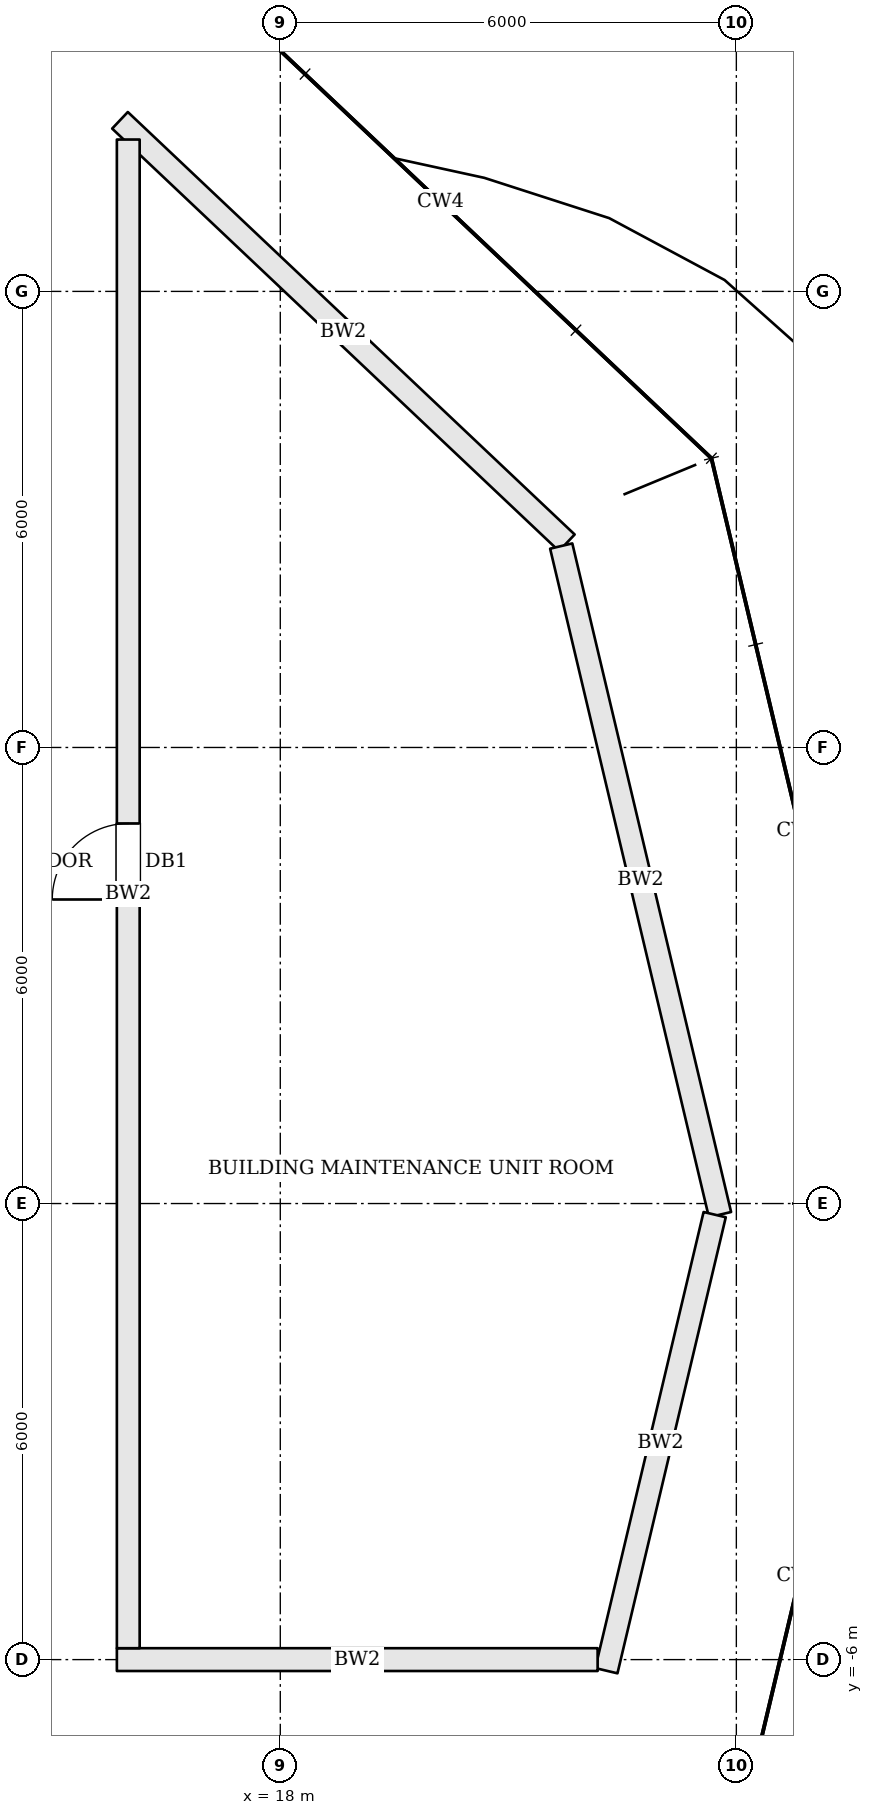
"""IFC4 building model, lengths in metres.
Left out: names, types, materials, properties, quantities, classifications, styles, units other than length and angle.
Written with IfcOpenShell. Run it as: python <this file> out.ifc"""

import sys

from ifc_helpers import new_model, si_unit, direction, frame, frame_2d, origin, place, context, subcontext, project, spatial, rectangle, extrude, element, fill, save


model = new_model("IFC4")
c1 = context("Model", 3, precision=1e-05, world=origin(), true_north=direction((0.0, 1.0)))
c2 = subcontext(c1, "Body", "Model", "MODEL_VIEW")
j1 = project(units=[si_unit("LENGTHUNIT", "METRE"), si_unit("PLANEANGLEUNIT", "RADIAN")], contexts=[c1])
p1 = place(None, origin())
s1 = spatial("IfcSite", under=j1, at=p1, CompositionType="ELEMENT")
p2 = place(p1, origin())
s2 = spatial("IfcBuilding", under=s1, at=p2, CompositionType="ELEMENT")
p3 = place(p2, frame((0.0, 0.0, 307.8)))
s3 = spatial("IfcBuildingStorey", under=s2, at=p3, CompositionType="ELEMENT", Elevation=307.8)
p4 = place(p3, frame((15.891, 14.251, 0.0), z_axis=(0.0, 0.0, 1.0), x_axis=(0.726669936256, -0.686986756598, 0.0)))
e1 = element("IfcWall", 1, at=p4, inside=s3, PredefinedType="SOLIDWALL", context=c2, shape_type="SweptSolid", body=[
    extrude(rectangle(XDim=8.09, YDim=0.3, at=frame_2d((4.045, 0.0))), origin(), (0.0, 0.0, 1.0), 3.484),
])
p5 = place(p3, frame((21.696, 8.65, 0.0), z_axis=(0.0, 0.0, 1.0), x_axis=(0.231055814684, -0.972940496896, 0.0)))
e2 = element("IfcWall", 2, at=p5, inside=s3, PredefinedType="SOLIDWALL", context=c2, shape_type="SweptSolid", body=[
    extrude(rectangle(XDim=9.041, YDim=0.3, at=frame_2d((4.52, 0.0))), origin(), (0.0, 0.0, 1.0), 3.484),
])
p6 = place(p3, frame((23.715, -0.146, 0.0), z_axis=(0.0, 0.0, 1.0), x_axis=(-0.231079925788, -0.972934770629, 0.0)))
e3 = element("IfcWall", 3, at=p6, inside=s3, PredefinedType="SOLIDWALL", context=c2, shape_type="SweptSolid", body=[
    extrude(rectangle(XDim=6.167, YDim=0.3, at=frame_2d((3.083, 0.0))), origin(), (0.0, 0.0, 1.0), 3.484),
])
p7 = place(p3, frame((22.175, -6.0, 0.0), z_axis=(0.0, 0.0, 1.0), x_axis=(-1.0, 0.0, 0.0)))
e4 = element("IfcWall", 4, at=p7, inside=s3, PredefinedType="SOLIDWALL", context=c2, shape_type="SweptSolid", body=[
    extrude(rectangle(XDim=6.325, YDim=0.3, at=frame_2d((3.163, 0.0))), origin(), (0.0, 0.0, 1.0), 3.484),
])
p8 = place(p3, frame((16.0, -5.85, 0.0), z_axis=(0.0, 0.0, 1.0), x_axis=(0.0, 1.0, 0.0)))
e5 = element("IfcWall", 5, at=p8, inside=s3, PredefinedType="SOLIDWALL", context=c2, shape_type="SweptSolid", body=[
    extrude(rectangle(XDim=19.848, YDim=0.3, at=frame_2d((9.924, 0.0))), origin(), (0.0, 0.0, 1.0), 3.484),
])
p9 = place(p8, frame((9.85, 0.0, 0.0)))
e6 = element("IfcOpeningElement", 6, at=p9, cuts=e5, PredefinedType="OPENING", context=c2, shape_type="SweptSolid", body=[
    extrude(rectangle(XDim=1.0, YDim=2.1, at=frame_2d((0.5, 1.05))), frame((0.0, 0.16, 0.0), z_axis=(0.0, -1.0, 0.0), x_axis=(1.0, 0.0, 0.0)), (0.0, 0.0, 1.0), 0.32),
])
p10 = place(p9, origin())
e7 = element("IfcDoor", 7, at=p10, inside=s3, OperationType="SINGLE_SWING_LEFT", PredefinedType="DOOR", context=c2, shape_type="SweptSolid", body=[
    extrude(rectangle(XDim=1.0, YDim=2.1, at=frame_2d((0.5, 1.05))), frame((0.0, 0.025, 0.0), z_axis=(0.0, -1.0, 0.0), x_axis=(1.0, 0.0, 0.0)), (0.0, 0.0, 1.0), 0.05),
])
fill(e6, e7)
save(model, sys.argv[1])
